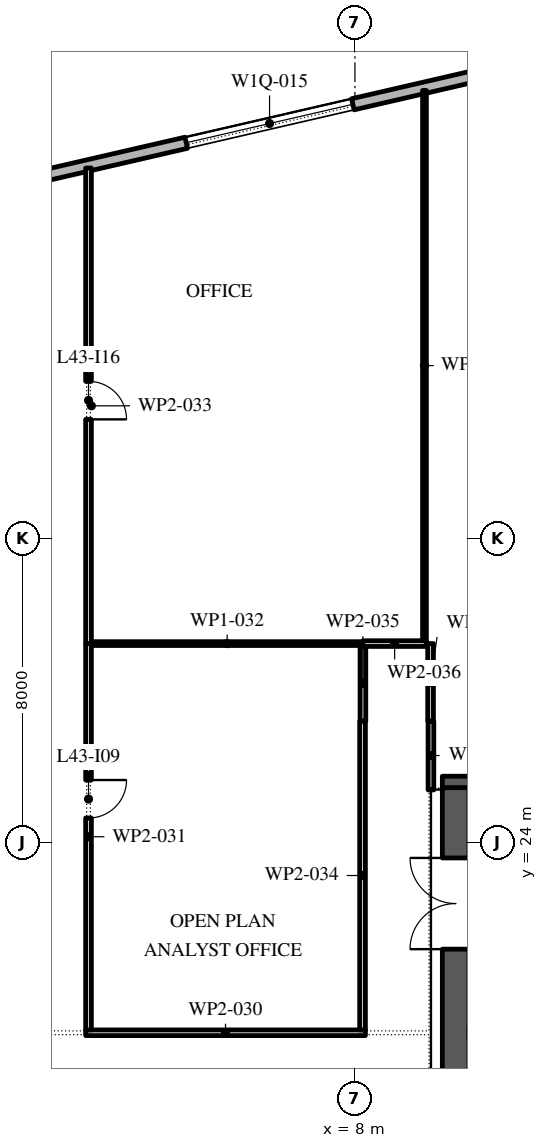
"""IFC4 building model, lengths in metres.
Left out: names, types, materials, properties, quantities, classifications, styles, units other than length and angle.
Written with IfcOpenShell. Run it as: python <this file> out.ifc"""

import sys

from ifc_helpers import new_model, si_unit, direction, frame, frame_2d, origin, place, context, subcontext, project, spatial, rectangle, extrude, element, fill, save


model = new_model("IFC4")
c1 = context("Model", 3, precision=1e-05, world=origin(), true_north=direction((0.0, 1.0)))
c2 = subcontext(c1, "Body", "Model", "MODEL_VIEW")
j1 = project(units=[si_unit("LENGTHUNIT", "METRE"), si_unit("PLANEANGLEUNIT", "RADIAN")], contexts=[c1])
p1 = place(None, origin())
s1 = spatial("IfcSite", under=j1, at=p1, CompositionType="ELEMENT")
p2 = place(p1, origin())
s2 = spatial("IfcBuilding", under=s1, at=p2, CompositionType="ELEMENT")
p3 = place(p2, frame((0.0, 0.0, 196.8)))
s3 = spatial("IfcBuildingStorey", under=s2, at=p3, CompositionType="ELEMENT", Elevation=196.8)
p4 = place(p3, frame((17.592, 45.657, 0.0), z_axis=(0.0, 0.0, 1.0), x_axis=(-0.974370243697, -0.224950279389, 0.0)))
e1 = element("IfcWall", 1, at=p4, inside=s3, PredefinedType="STANDARD", context=c2, shape_type="SweptSolid", body=[
    extrude(rectangle(XDim=49.5, YDim=0.3, at=frame_2d((24.75, 0.0))), origin(), (0.0, 0.0, 1.0), 4.0),
])
p5 = place(p4, frame((2.8, 0.0, 0.0)))
e2 = element("IfcOpeningElement", 2, at=p5, cuts=e1, PredefinedType="OPENING", context=c2, shape_type="SweptSolid", body=[
    extrude(rectangle(XDim=2.4, YDim=3.5, at=frame_2d((1.2, 1.75))), frame((0.0, 0.16, 0.0), z_axis=(0.0, -1.0, 0.0), x_axis=(1.0, 0.0, 0.0)), (0.0, 0.0, 1.0), 0.32),
])
p6 = place(p4, frame((9.9, 0.0, 0.45)))
e3 = element("IfcOpeningElement", 3, at=p6, cuts=e1, PredefinedType="OPENING", context=c2, shape_type="SweptSolid", body=[
    extrude(rectangle(XDim=4.5, YDim=2.45, at=frame_2d((2.25, 1.225))), frame((0.0, 0.16, 0.0), z_axis=(0.0, -1.0, 0.0), x_axis=(1.0, 0.0, 0.0)), (0.0, 0.0, 1.0), 0.32),
])
p7 = place(p4, frame((18.2, 0.0, 0.45)))
e4 = element("IfcOpeningElement", 4, at=p7, cuts=e1, PredefinedType="OPENING", context=c2, shape_type="SweptSolid", body=[
    extrude(rectangle(XDim=4.5, YDim=2.45, at=frame_2d((2.25, 1.225))), frame((0.0, 0.16, 0.0), z_axis=(0.0, -1.0, 0.0), x_axis=(1.0, 0.0, 0.0)), (0.0, 0.0, 1.0), 0.32),
])
p8 = place(p4, frame((26.5, 0.0, 0.45)))
e5 = element("IfcOpeningElement", 5, at=p8, cuts=e1, PredefinedType="OPENING", context=c2, shape_type="SweptSolid", body=[
    extrude(rectangle(XDim=4.5, YDim=2.525, at=frame_2d((2.25, 1.262))), frame((0.0, 0.16, 0.0), z_axis=(0.0, -1.0, 0.0), x_axis=(1.0, 0.0, 0.0)), (0.0, 0.0, 1.0), 0.32),
])
p9 = place(p4, frame((35.85, 0.0, 0.0)))
e6 = element("IfcOpeningElement", 6, at=p9, cuts=e1, PredefinedType="OPENING", context=c2, shape_type="SweptSolid", body=[
    extrude(rectangle(XDim=2.4, YDim=3.5, at=frame_2d((1.2, 1.75))), frame((0.0, 0.16, 0.0), z_axis=(0.0, -1.0, 0.0), x_axis=(1.0, 0.0, 0.0)), (0.0, 0.0, 1.0), 0.32),
])
p10 = place(p4, frame((43.1, 0.0, 0.45)))
e7 = element("IfcOpeningElement", 7, at=p10, cuts=e1, PredefinedType="OPENING", context=c2, shape_type="SweptSolid", body=[
    extrude(rectangle(XDim=4.5, YDim=2.675, at=frame_2d((2.25, 1.337))), frame((0.0, 0.16, 0.0), z_axis=(0.0, -1.0, 0.0), x_axis=(1.0, 0.0, 0.0)), (0.0, 0.0, 1.0), 0.32),
])
p11 = place(p3, frame((10.65, -2.45, 0.0), z_axis=(0.0, 0.0, 1.0), x_axis=(0.0, 1.0, 0.0)))
e8 = element("IfcWall", 8, at=p11, inside=s3, PredefinedType="SHEAR", context=c2, shape_type="SweptSolid", body=[
    extrude(rectangle(XDim=27.9, YDim=0.7, at=frame_2d((13.95, 0.0))), origin(), (0.0, 0.0, 1.0), 4.0),
])
p12 = place(p11, frame((23.65, 0.0, 0.0)))
e9 = element("IfcOpeningElement", 9, at=p12, cuts=e8, PredefinedType="OPENING", context=c2, shape_type="SweptSolid", body=[
    extrude(rectangle(XDim=2.4, YDim=2.1, at=frame_2d((1.2, 1.05))), frame((0.0, 0.36, 0.0), z_axis=(0.0, -1.0, 0.0), x_axis=(1.0, 0.0, 0.0)), (0.0, 0.0, 1.0), 0.72),
])
p13 = place(p11, frame((0.788, 0.0, 0.0)))
e10 = element("IfcOpeningElement", 10, at=p13, cuts=e8, PredefinedType="OPENING", context=c2, shape_type="SweptSolid", body=[
    extrude(rectangle(XDim=0.9, YDim=2.1, at=frame_2d((0.45, 1.05))), frame((0.0, 0.36, 0.0), z_axis=(0.0, -1.0, 0.0), x_axis=(1.0, 0.0, 0.0)), (0.0, 0.0, 1.0), 0.72),
])
p14 = place(p11, frame((3.962, 0.0, 0.0)))
e11 = element("IfcOpeningElement", 11, at=p14, cuts=e8, PredefinedType="OPENING", context=c2, shape_type="SweptSolid", body=[
    extrude(rectangle(XDim=1.0, YDim=2.1, at=frame_2d((0.5, 1.05))), frame((0.0, 0.36, 0.0), z_axis=(0.0, -1.0, 0.0), x_axis=(1.0, 0.0, 0.0)), (0.0, 0.0, 1.0), 0.72),
])
p15 = place(p3, frame((10.3, 25.6, 0.0), z_axis=(0.0, 0.0, 1.0), x_axis=(1.0, 0.0, 0.0)))
e12 = element("IfcWall", 12, at=p15, inside=s3, PredefinedType="SHEAR", context=c2, shape_type="SweptSolid", body=[
    extrude(rectangle(XDim=11.4, YDim=0.3, at=frame_2d((5.7, 0.0))), origin(), (0.0, 0.0, 1.0), 4.0),
])
p16 = place(p3, frame((0.915, 19.0, 0.0), z_axis=(0.0, 0.0, 1.0), x_axis=(1.0, 0.0, 0.0)))
e13 = element("IfcWall", 13, at=p16, inside=s3, PredefinedType="PARTITIONING", context=c2, shape_type="SweptSolid", body=[
    extrude(rectangle(XDim=7.36, YDim=0.15, at=frame_2d((3.68, 0.0))), origin(), (0.0, 0.0, 1.0), 4.0),
])
p17 = place(p3, frame((0.99, 29.24, 0.0), z_axis=(0.0, 0.0, 1.0), x_axis=(0.0, -1.0, 0.0)))
e14 = element("IfcWall", 14, at=p17, inside=s3, PredefinedType="PARTITIONING", context=c2, shape_type="SweptSolid", body=[
    extrude(rectangle(XDim=10.165, YDim=0.15, at=frame_2d((5.083, 0.0))), origin(), (0.0, 0.0, 1.0), 4.0),
])
p18 = place(p17, frame((3.59, 0.0, 0.0)))
e15 = element("IfcOpeningElement", 15, at=p18, cuts=e14, PredefinedType="OPENING", context=c2, shape_type="SweptSolid", body=[
    extrude(rectangle(XDim=1.0, YDim=2.1, at=frame_2d((0.5, 1.05))), frame((0.0, 0.085, 0.0), z_axis=(0.0, -1.0, 0.0), x_axis=(1.0, 0.0, 0.0)), (0.0, 0.0, 1.0), 0.17),
])
p19 = place(p3, frame((1.065, 29.24, 0.0), z_axis=(0.0, 0.0, 1.0), x_axis=(1.0, 0.0, 0.0)))
e16 = element("IfcWall", 16, at=p19, inside=s3, PredefinedType="PARTITIONING", context=c2, shape_type="SweptSolid", body=[
    extrude(rectangle(XDim=7.145, YDim=0.1, at=frame_2d((3.573, 0.0))), origin(), (0.0, 0.0, 1.0), 4.0),
])
p20 = place(p3, frame((0.99, 41.753, 0.0), z_axis=(0.0, 0.0, 1.0), x_axis=(0.0, -1.0, 0.0)))
e17 = element("IfcWall", 17, at=p20, inside=s3, PredefinedType="PARTITIONING", context=c2, shape_type="SweptSolid", body=[
    extrude(rectangle(XDim=12.513, YDim=0.15, at=frame_2d((6.256, 0.0))), origin(), (0.0, 0.0, 1.0), 4.0),
])
p21 = place(p20, frame((5.613, 0.0, 0.0)))
e18 = element("IfcOpeningElement", 18, at=p21, cuts=e17, PredefinedType="OPENING", context=c2, shape_type="SweptSolid", body=[
    extrude(rectangle(XDim=1.0, YDim=2.1, at=frame_2d((0.5, 1.05))), frame((0.0, 0.085, 0.0), z_axis=(0.0, -1.0, 0.0), x_axis=(1.0, 0.0, 0.0)), (0.0, 0.0, 1.0), 0.17),
])
p22 = place(p3, frame((8.2, 19.075, 0.0), z_axis=(0.0, 0.0, 1.0), x_axis=(0.0, 1.0, 0.0)))
e19 = element("IfcWall", 19, at=p22, inside=s3, PredefinedType="PARTITIONING", context=c2, shape_type="SweptSolid", body=[
    extrude(rectangle(XDim=8.125, YDim=0.15, at=frame_2d((4.062, 0.0))), origin(), (0.0, 0.0, 1.0), 4.0),
])
p23 = place(p3, frame((8.21, 27.2, 0.0), z_axis=(0.0, 0.0, 1.0), x_axis=(0.0, 1.0, 0.0)))
e20 = element("IfcWall", 20, at=p23, inside=s3, PredefinedType="PARTITIONING", context=c2, shape_type="SweptSolid", body=[
    extrude(rectangle(XDim=1.99, YDim=0.15, at=frame_2d((0.995, 0.0))), origin(), (0.0, 0.0, 1.0), 4.0),
])
p24 = place(p3, frame((8.21, 29.24, 0.0), z_axis=(0.0, 0.0, 1.0), x_axis=(1.0, 0.0, 0.0)))
e21 = element("IfcWall", 21, at=p24, inside=s3, PredefinedType="PARTITIONING", context=c2, shape_type="SweptSolid", body=[
    extrude(rectangle(XDim=1.67, YDim=0.15, at=frame_2d((0.835, 0.0))), origin(), (0.0, 0.0, 1.0), 4.0),
])
p25 = place(p3, frame((9.83, 43.794, 0.0), z_axis=(0.0, 0.0, 1.0), x_axis=(0.0, -1.0, 0.0)))
e22 = element("IfcWall", 22, at=p25, inside=s3, PredefinedType="PARTITIONING", context=c2, shape_type="SweptSolid", body=[
    extrude(rectangle(XDim=14.479, YDim=0.1, at=frame_2d((7.24, 0.0))), origin(), (0.0, 0.0, 1.0), 3.02),
])
p26 = place(p3, frame((9.99, 29.24, 0.0), z_axis=(0.0, 0.0, 1.0), x_axis=(0.0, -1.0, 0.0)))
e23 = element("IfcWall", 23, at=p26, inside=s3, PredefinedType="PARTITIONING", context=c2, shape_type="SweptSolid", body=[
    extrude(rectangle(XDim=2.04, YDim=0.15, at=frame_2d((1.02, 0.0))), origin(), (0.0, 0.0, 1.0), 3.02),
])
p27 = place(p3, frame((10.0, 27.2, 0.0), z_axis=(0.0, 0.0, 1.0), x_axis=(0.0, -1.0, 0.0)))
e24 = element("IfcWall", 24, at=p27, inside=s3, PredefinedType="PARTITIONING", context=c2, shape_type="SweptSolid", body=[
    extrude(rectangle(XDim=1.81, YDim=0.15, at=frame_2d((0.905, 0.0))), origin(), (0.0, 0.0, 1.0), 3.02),
])
p28 = place(p6, origin())
e25 = element("IfcWindow", 25, at=p28, inside=s3, PartitioningType="DOUBLE_PANEL_VERTICAL", PredefinedType="WINDOW", context=c2, shape_type="SweptSolid", body=[
    extrude(rectangle(XDim=4.5, YDim=2.45, at=frame_2d((2.25, 1.225))), frame((0.0, 0.03, 0.0), z_axis=(0.0, -1.0, 0.0), x_axis=(1.0, 0.0, 0.0)), (0.0, 0.0, 1.0), 0.06),
])
fill(e3, e25)
p29 = place(p12, origin())
e26 = element("IfcDoor", 26, at=p29, inside=s3, OperationType="DOUBLE_DOOR_SINGLE_SWING", PredefinedType="DOOR", context=c2, shape_type="SweptSolid", body=[
    extrude(rectangle(XDim=2.4, YDim=2.1, at=frame_2d((1.2, 1.05))), frame((0.0, 0.025, 0.0), z_axis=(0.0, -1.0, 0.0), x_axis=(1.0, 0.0, 0.0)), (0.0, 0.0, 1.0), 0.05),
])
fill(e9, e26)
p30 = place(p18, origin())
e27 = element("IfcDoor", 27, at=p30, inside=s3, OperationType="SINGLE_SWING_RIGHT", PredefinedType="DOOR", context=c2, shape_type="SweptSolid", body=[
    extrude(rectangle(XDim=1.0, YDim=2.1, at=frame_2d((0.5, 1.05))), frame((0.0, 0.025, 0.0), z_axis=(0.0, -1.0, 0.0), x_axis=(1.0, 0.0, 0.0)), (0.0, 0.0, 1.0), 0.05),
])
fill(e15, e27)
p31 = place(p21, origin())
e28 = element("IfcDoor", 28, at=p31, inside=s3, OperationType="SINGLE_SWING_LEFT", PredefinedType="DOOR", context=c2, shape_type="SweptSolid", body=[
    extrude(rectangle(XDim=1.0, YDim=2.1, at=frame_2d((0.5, 1.05))), frame((0.0, 0.025, 0.0), z_axis=(0.0, -1.0, 0.0), x_axis=(1.0, 0.0, 0.0)), (0.0, 0.0, 1.0), 0.05),
])
fill(e18, e28)
save(model, sys.argv[1])
